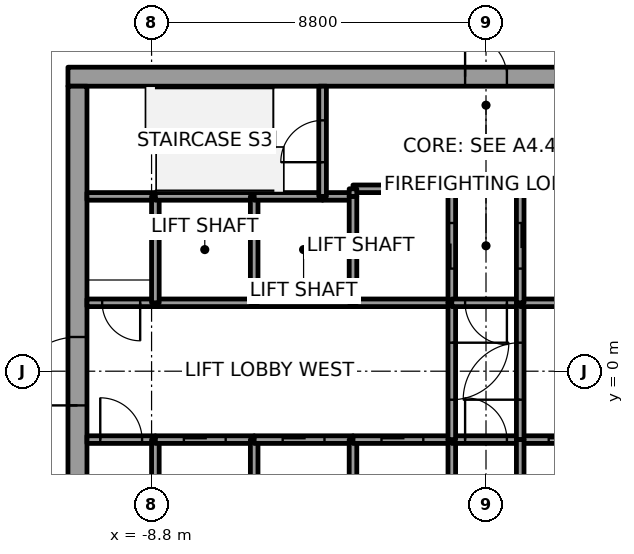
"""IFC4 building model, lengths in metres.
Left out: names, types, materials, properties, quantities, classifications, styles, units other than length and angle.
Written with IfcOpenShell. Run it as: python <this file> out.ifc"""

import sys

from ifc_helpers import new_model, si_unit, direction, frame, frame_2d, origin, place, context, subcontext, project, spatial, rectangle, extrude, element, fill, save


model = new_model("IFC4")
c1 = context("Model", 3, precision=1e-05, world=origin(), true_north=direction((0.0, 1.0)))
c2 = subcontext(c1, "Body", "Model", "MODEL_VIEW")
j1 = project(units=[si_unit("LENGTHUNIT", "METRE"), si_unit("PLANEANGLEUNIT", "RADIAN")], contexts=[c1])
p1 = place(None, origin())
s1 = spatial("IfcSite", under=j1, at=p1, CompositionType="ELEMENT")
p2 = place(p1, origin())
s2 = spatial("IfcBuilding", under=s1, at=p2, CompositionType="ELEMENT")
p3 = place(p2, frame((0.0, 0.0, 193.8)))
s3 = spatial("IfcBuildingStorey", under=s2, at=p3, CompositionType="ELEMENT", Elevation=193.8)
p4 = place(p3, frame((-11.0, 7.75, 0.0), z_axis=(0.0, 0.0, 1.0), x_axis=(1.0, 0.0, 0.0)))
e1 = element("IfcWall", 1, at=p4, inside=s3, PredefinedType="SHEAR", context=c2, shape_type="SweptSolid", body=[
    extrude(rectangle(XDim=22.0, YDim=0.5, at=frame_2d((11.0, 0.0))), origin(), (0.0, 0.0, 1.0), 4.0),
])
p5 = place(p4, frame((10.45, 0.0, 0.0)))
e2 = element("IfcOpeningElement", 2, at=p5, cuts=e1, PredefinedType="OPENING", context=c2, shape_type="SweptSolid", body=[
    extrude(rectangle(XDim=1.1, YDim=2.1, at=frame_2d((0.55, 1.05))), frame((0.0, 0.25, 0.0), z_axis=(0.0, -1.0, 0.0), x_axis=(1.0, 0.0, 0.0)), (0.0, 0.0, 1.0), 0.5),
])
p6 = place(p3, frame((-10.75, -7.5, 0.0), z_axis=(0.0, 0.0, 1.0), x_axis=(0.0, 1.0, 0.0)))
e3 = element("IfcWall", 3, at=p6, inside=s3, PredefinedType="SHEAR", context=c2, shape_type="SweptSolid", body=[
    extrude(rectangle(XDim=15.0, YDim=0.5, at=frame_2d((7.5, 0.0))), origin(), (0.0, 0.0, 1.0), 4.0),
])
p7 = place(p6, frame((6.6, 0.0, 0.0)))
e4 = element("IfcOpeningElement", 4, at=p7, cuts=e3, PredefinedType="OPENING", context=c2, shape_type="SweptSolid", body=[
    extrude(rectangle(XDim=1.8, YDim=2.1, at=frame_2d((0.9, 1.05))), frame((0.0, 0.25, 0.0), z_axis=(0.0, -1.0, 0.0), x_axis=(1.0, 0.0, 0.0)), (0.0, 0.0, 1.0), 0.5),
])
p8 = place(p3, frame((-10.5, -1.8, 0.0), z_axis=(0.0, 0.0, 1.0), x_axis=(1.0, 0.0, 0.0)))
e5 = element("IfcWall", 5, at=p8, inside=s3, PredefinedType="SOLIDWALL", context=c2, shape_type="SweptSolid", body=[
    extrude(rectangle(XDim=1.8, YDim=0.2, at=frame_2d((0.9, 0.0))), origin(), (0.0, 0.0, 1.0), 3.85),
])
p9 = place(p8, frame((0.35, 0.0, 0.0)))
e6 = element("IfcOpeningElement", 6, at=p9, cuts=e5, PredefinedType="OPENING", context=c2, shape_type="SweptSolid", body=[
    extrude(rectangle(XDim=1.1, YDim=2.1, at=frame_2d((0.55, 1.05))), frame((0.0, 0.1, 0.0), z_axis=(0.0, -1.0, 0.0), x_axis=(1.0, 0.0, 0.0)), (0.0, 0.0, 1.0), 0.2),
])
p10 = place(p3, frame((-8.7, 1.8, 0.0), z_axis=(0.0, 0.0, 1.0), x_axis=(-1.0, 0.0, 0.0)))
e7 = element("IfcWall", 7, at=p10, inside=s3, PredefinedType="SOLIDWALL", context=c2, shape_type="SweptSolid", body=[
    extrude(rectangle(XDim=1.8, YDim=0.2, at=frame_2d((0.9, 0.0))), origin(), (0.0, 0.0, 1.0), 3.85),
])
p11 = place(p10, frame((0.4, 0.0, 0.0)))
e8 = element("IfcOpeningElement", 8, at=p11, cuts=e7, PredefinedType="OPENING", context=c2, shape_type="SweptSolid", body=[
    extrude(rectangle(XDim=1.0, YDim=2.1, at=frame_2d((0.5, 1.05))), frame((0.0, 0.1, 0.0), z_axis=(0.0, -1.0, 0.0), x_axis=(1.0, 0.0, 0.0)), (0.0, 0.0, 1.0), 0.2),
])
p12 = place(p3, frame((-8.7, 4.6, 0.0), z_axis=(0.0, 0.0, 1.0), x_axis=(-1.0, 0.0, 0.0)))
e9 = element("IfcWall", 9, at=p12, inside=s3, PredefinedType="SOLIDWALL", context=c2, shape_type="SweptSolid", body=[
    extrude(rectangle(XDim=1.8, YDim=0.2, at=frame_2d((0.9, 0.0))), origin(), (0.0, 0.0, 1.0), 3.85),
])
p13 = place(p3, frame((-8.7, -4.6, 0.0), z_axis=(0.0, 0.0, 1.0), x_axis=(0.0, 1.0, 0.0)))
e10 = element("IfcWall", 10, at=p13, inside=s3, PredefinedType="SOLIDWALL", context=c2, shape_type="SweptSolid", body=[
    extrude(rectangle(XDim=2.8, YDim=0.2, at=frame_2d((1.4, 0.0))), origin(), (0.0, 0.0, 1.0), 3.85),
])
p14 = place(p3, frame((-8.7, -1.8, 0.0), z_axis=(0.0, 0.0, 1.0), x_axis=(1.0, 0.0, 0.0)))
e11 = element("IfcWall", 11, at=p14, inside=s3, PredefinedType="SOLIDWALL", context=c2, shape_type="SweptSolid", body=[
    extrude(rectangle(XDim=2.6, YDim=0.2, at=frame_2d((1.3, 0.0))), origin(), (0.0, 0.0, 1.0), 3.85),
])
p15 = place(p14, frame((0.75, 0.0, 0.0)))
e12 = element("IfcOpeningElement", 12, at=p15, cuts=e11, PredefinedType="OPENING", context=c2, shape_type="SweptSolid", body=[
    extrude(rectangle(XDim=1.1, YDim=2.1, at=frame_2d((0.55, 1.05))), frame((0.0, 0.1, 0.0), z_axis=(0.0, -1.0, 0.0), x_axis=(1.0, 0.0, 0.0)), (0.0, 0.0, 1.0), 0.2),
])
p16 = place(p3, frame((-6.1, 1.8, 0.0), z_axis=(0.0, 0.0, 1.0), x_axis=(-1.0, 0.0, 0.0)))
e13 = element("IfcWall", 13, at=p16, inside=s3, PredefinedType="SOLIDWALL", context=c2, shape_type="SweptSolid", body=[
    extrude(rectangle(XDim=2.6, YDim=0.2, at=frame_2d((1.3, 0.0))), origin(), (0.0, 0.0, 1.0), 3.85),
])
p17 = place(p3, frame((-8.7, 1.8, 0.0), z_axis=(0.0, 0.0, 1.0), x_axis=(0.0, 1.0, 0.0)))
e14 = element("IfcWall", 14, at=p17, inside=s3, PredefinedType="SOLIDWALL", context=c2, shape_type="SweptSolid", body=[
    extrude(rectangle(XDim=2.8, YDim=0.2, at=frame_2d((1.4, 0.0))), origin(), (0.0, 0.0, 1.0), 3.85),
])
p18 = place(p3, frame((-6.1, 4.6, 0.0), z_axis=(0.0, 0.0, 1.0), x_axis=(-1.0, 0.0, 0.0)))
e15 = element("IfcWall", 15, at=p18, inside=s3, PredefinedType="SOLIDWALL", context=c2, shape_type="SweptSolid", body=[
    extrude(rectangle(XDim=2.6, YDim=0.2, at=frame_2d((1.3, 0.0))), origin(), (0.0, 0.0, 1.0), 3.85),
])
p19 = place(p3, frame((-6.1, -4.6, 0.0), z_axis=(0.0, 0.0, 1.0), x_axis=(0.0, 1.0, 0.0)))
e16 = element("IfcWall", 16, at=p19, inside=s3, PredefinedType="SOLIDWALL", context=c2, shape_type="SweptSolid", body=[
    extrude(rectangle(XDim=2.8, YDim=0.2, at=frame_2d((1.4, 0.0))), origin(), (0.0, 0.0, 1.0), 3.85),
])
p20 = place(p3, frame((-6.1, -1.8, 0.0), z_axis=(0.0, 0.0, 1.0), x_axis=(1.0, 0.0, 0.0)))
e17 = element("IfcWall", 17, at=p20, inside=s3, PredefinedType="SOLIDWALL", context=c2, shape_type="SweptSolid", body=[
    extrude(rectangle(XDim=2.6, YDim=0.2, at=frame_2d((1.3, 0.0))), origin(), (0.0, 0.0, 1.0), 3.85),
])
p21 = place(p20, frame((0.75, 0.0, 0.0)))
e18 = element("IfcOpeningElement", 18, at=p21, cuts=e17, PredefinedType="OPENING", context=c2, shape_type="SweptSolid", body=[
    extrude(rectangle(XDim=1.1, YDim=2.1, at=frame_2d((0.55, 1.05))), frame((0.0, 0.1, 0.0), z_axis=(0.0, -1.0, 0.0), x_axis=(1.0, 0.0, 0.0)), (0.0, 0.0, 1.0), 0.2),
])
p22 = place(p3, frame((-3.5, 1.8, 0.0), z_axis=(0.0, 0.0, 1.0), x_axis=(-1.0, 0.0, 0.0)))
e19 = element("IfcWall", 19, at=p22, inside=s3, PredefinedType="SOLIDWALL", context=c2, shape_type="SweptSolid", body=[
    extrude(rectangle(XDim=2.6, YDim=0.2, at=frame_2d((1.3, 0.0))), origin(), (0.0, 0.0, 1.0), 3.85),
])
p23 = place(p3, frame((-6.1, 1.8, 0.0), z_axis=(0.0, 0.0, 1.0), x_axis=(0.0, 1.0, 0.0)))
e20 = element("IfcWall", 20, at=p23, inside=s3, PredefinedType="SOLIDWALL", context=c2, shape_type="SweptSolid", body=[
    extrude(rectangle(XDim=2.8, YDim=0.2, at=frame_2d((1.4, 0.0))), origin(), (0.0, 0.0, 1.0), 3.85),
])
p24 = place(p3, frame((-4.3, 4.6, 0.0), z_axis=(0.0, 0.0, 1.0), x_axis=(-1.0, 0.0, 0.0)))
e21 = element("IfcWall", 21, at=p24, inside=s3, PredefinedType="SOLIDWALL", context=c2, shape_type="SweptSolid", body=[
    extrude(rectangle(XDim=1.8, YDim=0.2, at=frame_2d((0.9, 0.0))), origin(), (0.0, 0.0, 1.0), 3.85),
])
p25 = place(p3, frame((-3.5, 4.6, 0.0), z_axis=(0.0, 0.0, 1.0), x_axis=(-1.0, 0.0, 0.0)))
e22 = element("IfcWall", 22, at=p25, inside=s3, PredefinedType="SOLIDWALL", context=c2, shape_type="SweptSolid", body=[
    extrude(rectangle(XDim=0.8, YDim=0.2, at=frame_2d((0.4, 0.0))), origin(), (0.0, 0.0, 1.0), 3.85),
])
p26 = place(p3, frame((-4.3, 4.6, 0.0), z_axis=(0.0, 0.0, 1.0), x_axis=(0.0, 1.0, 0.0)))
e23 = element("IfcWall", 23, at=p26, inside=s3, PredefinedType="SOLIDWALL", context=c2, shape_type="SweptSolid", body=[
    extrude(rectangle(XDim=2.9, YDim=0.2, at=frame_2d((1.45, 0.0))), origin(), (0.0, 0.0, 1.0), 3.85),
])
p27 = place(p26, frame((0.9, 0.0, 0.0)))
e24 = element("IfcOpeningElement", 24, at=p27, cuts=e23, PredefinedType="OPENING", context=c2, shape_type="SweptSolid", body=[
    extrude(rectangle(XDim=1.1, YDim=2.1, at=frame_2d((0.55, 1.05))), frame((0.0, 0.1, 0.0), z_axis=(0.0, -1.0, 0.0), x_axis=(1.0, 0.0, 0.0)), (0.0, 0.0, 1.0), 0.2),
])
p28 = place(p3, frame((-3.5, -4.6, 0.0), z_axis=(0.0, 0.0, 1.0), x_axis=(0.0, 1.0, 0.0)))
e25 = element("IfcWall", 25, at=p28, inside=s3, PredefinedType="SOLIDWALL", context=c2, shape_type="SweptSolid", body=[
    extrude(rectangle(XDim=2.8, YDim=0.2, at=frame_2d((1.4, 0.0))), origin(), (0.0, 0.0, 1.0), 3.85),
])
p29 = place(p3, frame((-3.5, -1.8, 0.0), z_axis=(0.0, 0.0, 1.0), x_axis=(1.0, 0.0, 0.0)))
e26 = element("IfcWall", 26, at=p29, inside=s3, PredefinedType="SOLIDWALL", context=c2, shape_type="SweptSolid", body=[
    extrude(rectangle(XDim=2.6, YDim=0.2, at=frame_2d((1.3, 0.0))), origin(), (0.0, 0.0, 1.0), 3.85),
])
p30 = place(p29, frame((0.75, 0.0, 0.0)))
e27 = element("IfcOpeningElement", 27, at=p30, cuts=e26, PredefinedType="OPENING", context=c2, shape_type="SweptSolid", body=[
    extrude(rectangle(XDim=1.1, YDim=2.1, at=frame_2d((0.55, 1.05))), frame((0.0, 0.1, 0.0), z_axis=(0.0, -1.0, 0.0), x_axis=(1.0, 0.0, 0.0)), (0.0, 0.0, 1.0), 0.2),
])
p31 = place(p3, frame((-0.9, 1.8, 0.0), z_axis=(0.0, 0.0, 1.0), x_axis=(-1.0, 0.0, 0.0)))
e28 = element("IfcWall", 28, at=p31, inside=s3, PredefinedType="SOLIDWALL", context=c2, shape_type="SweptSolid", body=[
    extrude(rectangle(XDim=2.6, YDim=0.2, at=frame_2d((1.3, 0.0))), origin(), (0.0, 0.0, 1.0), 3.85),
])
p32 = place(p3, frame((-3.5, 4.6, 0.0), z_axis=(0.0, 0.0, 1.0), x_axis=(0.0, -1.0, 0.0)))
e29 = element("IfcWall", 29, at=p32, inside=s3, PredefinedType="SOLIDWALL", context=c2, shape_type="SweptSolid", body=[
    extrude(rectangle(XDim=2.8, YDim=0.2, at=frame_2d((1.4, 0.0))), origin(), (0.0, 0.0, 1.0), 3.85),
])
p33 = place(p3, frame((-0.9, 1.8, 0.0), z_axis=(0.0, 0.0, 1.0), x_axis=(0.0, 1.0, 0.0)))
e30 = element("IfcWall", 30, at=p33, inside=s3, PredefinedType="SOLIDWALL", context=c2, shape_type="SweptSolid", body=[
    extrude(rectangle(XDim=3.0, YDim=0.2, at=frame_2d((1.5, 0.0))), origin(), (0.0, 0.0, 1.0), 3.85),
])
p34 = place(p33, frame((0.9, 0.0, 0.0)))
e31 = element("IfcOpeningElement", 31, at=p34, cuts=e30, PredefinedType="OPENING", context=c2, shape_type="SweptSolid", body=[
    extrude(rectangle(XDim=1.2, YDim=2.1, at=frame_2d((0.6, 1.05))), frame((0.0, 0.1, 0.0), z_axis=(0.0, -1.0, 0.0), x_axis=(1.0, 0.0, 0.0)), (0.0, 0.0, 1.0), 0.2),
])
p35 = place(p3, frame((-0.9, 4.8, 0.0), z_axis=(0.0, 0.0, 1.0), x_axis=(-1.0, 0.0, 0.0)))
e32 = element("IfcWall", 32, at=p35, inside=s3, PredefinedType="SOLIDWALL", context=c2, shape_type="SweptSolid", body=[
    extrude(rectangle(XDim=2.6, YDim=0.2, at=frame_2d((1.3, 0.0))), origin(), (0.0, 0.0, 1.0), 3.85),
])
p36 = place(p3, frame((-3.5, 4.8, 0.0), z_axis=(0.0, 0.0, 1.0), x_axis=(0.0, -1.0, 0.0)))
e33 = element("IfcWall", 33, at=p36, inside=s3, PredefinedType="SOLIDWALL", context=c2, shape_type="SweptSolid", body=[
    extrude(rectangle(XDim=0.2, YDim=0.2, at=frame_2d((0.1, 0.0))), origin(), (0.0, 0.0, 1.0), 3.85),
])
p37 = place(p3, frame((-0.9, -4.6, 0.0), z_axis=(0.0, 0.0, 1.0), x_axis=(0.0, 1.0, 0.0)))
e34 = element("IfcWall", 34, at=p37, inside=s3, PredefinedType="SOLIDWALL", context=c2, shape_type="SweptSolid", body=[
    extrude(rectangle(XDim=2.8, YDim=0.2, at=frame_2d((1.4, 0.0))), origin(), (0.0, 0.0, 1.0), 3.85),
])
p38 = place(p3, frame((-0.9, -1.8, 0.0), z_axis=(0.0, 0.0, 1.0), x_axis=(1.0, 0.0, 0.0)))
e35 = element("IfcWall", 35, at=p38, inside=s3, PredefinedType="SOLIDWALL", context=c2, shape_type="SweptSolid", body=[
    extrude(rectangle(XDim=1.8, YDim=0.2, at=frame_2d((0.9, 0.0))), origin(), (0.0, 0.0, 1.0), 3.85),
])
p39 = place(p38, frame((0.35, 0.0, 0.0)))
e36 = element("IfcOpeningElement", 36, at=p39, cuts=e35, PredefinedType="OPENING", context=c2, shape_type="SweptSolid", body=[
    extrude(rectangle(XDim=1.1, YDim=2.1, at=frame_2d((0.55, 1.05))), frame((0.0, 0.1, 0.0), z_axis=(0.0, -1.0, 0.0), x_axis=(1.0, 0.0, 0.0)), (0.0, 0.0, 1.0), 0.2),
])
p40 = place(p3, frame((-0.9, 1.8, 0.0), z_axis=(0.0, 0.0, 1.0), x_axis=(0.0, -1.0, 0.0)))
e37 = element("IfcWall", 37, at=p40, inside=s3, PredefinedType="SOLIDWALL", context=c2, shape_type="SweptSolid", body=[
    extrude(rectangle(XDim=3.6, YDim=0.2, at=frame_2d((1.8, 0.0))), origin(), (0.0, 0.0, 1.0), 3.85),
])
p41 = place(p40, frame((1.05, 0.0, 0.0)))
e38 = element("IfcOpeningElement", 38, at=p41, cuts=e37, PredefinedType="OPENING", context=c2, shape_type="SweptSolid", body=[
    extrude(rectangle(XDim=1.5, YDim=2.1, at=frame_2d((0.75, 1.05))), frame((0.0, 0.1, 0.0), z_axis=(0.0, -1.0, 0.0), x_axis=(1.0, 0.0, 0.0)), (0.0, 0.0, 1.0), 0.2),
])
p42 = place(p3, frame((0.9, 1.8, 0.0), z_axis=(0.0, 0.0, 1.0), x_axis=(-1.0, 0.0, 0.0)))
e39 = element("IfcWall", 39, at=p42, inside=s3, PredefinedType="SOLIDWALL", context=c2, shape_type="SweptSolid", body=[
    extrude(rectangle(XDim=1.8, YDim=0.2, at=frame_2d((0.9, 0.0))), origin(), (0.0, 0.0, 1.0), 3.85),
])
p43 = place(p42, frame((0.35, 0.0, 0.0)))
e40 = element("IfcOpeningElement", 40, at=p43, cuts=e39, PredefinedType="OPENING", context=c2, shape_type="SweptSolid", body=[
    extrude(rectangle(XDim=1.1, YDim=2.1, at=frame_2d((0.55, 1.05))), frame((0.0, 0.1, 0.0), z_axis=(0.0, -1.0, 0.0), x_axis=(1.0, 0.0, 0.0)), (0.0, 0.0, 1.0), 0.2),
])
p44 = place(p3, frame((0.9, -1.8, 0.0), z_axis=(0.0, 0.0, 1.0), x_axis=(1.0, 0.0, 0.0)))
e41 = element("IfcWall", 41, at=p44, inside=s3, PredefinedType="SOLIDWALL", context=c2, shape_type="SweptSolid", body=[
    extrude(rectangle(XDim=2.6, YDim=0.2, at=frame_2d((1.3, 0.0))), origin(), (0.0, 0.0, 1.0), 3.85),
])
p45 = place(p44, frame((0.75, 0.0, 0.0)))
e42 = element("IfcOpeningElement", 42, at=p45, cuts=e41, PredefinedType="OPENING", context=c2, shape_type="SweptSolid", body=[
    extrude(rectangle(XDim=1.1, YDim=2.1, at=frame_2d((0.55, 1.05))), frame((0.0, 0.1, 0.0), z_axis=(0.0, -1.0, 0.0), x_axis=(1.0, 0.0, 0.0)), (0.0, 0.0, 1.0), 0.2),
])
p46 = place(p3, frame((0.9, -1.8, 0.0), z_axis=(0.0, 0.0, 1.0), x_axis=(0.0, 1.0, 0.0)))
e43 = element("IfcWall", 43, at=p46, inside=s3, PredefinedType="SOLIDWALL", context=c2, shape_type="SweptSolid", body=[
    extrude(rectangle(XDim=3.6, YDim=0.2, at=frame_2d((1.8, 0.0))), origin(), (0.0, 0.0, 1.0), 3.85),
])
p47 = place(p46, frame((1.05, 0.0, 0.0)))
e44 = element("IfcOpeningElement", 44, at=p47, cuts=e43, PredefinedType="OPENING", context=c2, shape_type="SweptSolid", body=[
    extrude(rectangle(XDim=1.5, YDim=2.1, at=frame_2d((0.75, 1.05))), frame((0.0, 0.1, 0.0), z_axis=(0.0, -1.0, 0.0), x_axis=(1.0, 0.0, 0.0)), (0.0, 0.0, 1.0), 0.2),
])
p48 = place(p3, frame((0.9, -1.8, 0.0), z_axis=(0.0, 0.0, 1.0), x_axis=(0.0, -1.0, 0.0)))
e45 = element("IfcWall", 45, at=p48, inside=s3, PredefinedType="SOLIDWALL", context=c2, shape_type="SweptSolid", body=[
    extrude(rectangle(XDim=2.8, YDim=0.2, at=frame_2d((1.4, 0.0))), origin(), (0.0, 0.0, 1.0), 3.85),
])
for number, where, z_axis, x_axis in (
    (46, (3.5, 1.8, 0.0), (0.0, 0.0, 1.0), (-1.0, 0.0, 0.0)),
    (47, (3.5, 4.8, 0.0), (0.0, 0.0, 1.0), (-1.0, 0.0, 0.0)),
):
    element("IfcWall", number, at=place(p3, frame(where, z_axis=z_axis, x_axis=x_axis)), inside=s3, PredefinedType="SOLIDWALL", context=c2, shape_type="SweptSolid", body=[
        extrude(rectangle(XDim=2.6, YDim=0.2, at=frame_2d((1.3, 0.0))), origin(), (0.0, 0.0, 1.0), 3.85),
    ])
p49 = place(p3, frame((0.9, 4.8, 0.0), z_axis=(0.0, 0.0, 1.0), x_axis=(0.0, -1.0, 0.0)))
e48 = element("IfcWall", 48, at=p49, inside=s3, PredefinedType="SOLIDWALL", context=c2, shape_type="SweptSolid", body=[
    extrude(rectangle(XDim=3.0, YDim=0.2, at=frame_2d((1.5, 0.0))), origin(), (0.0, 0.0, 1.0), 3.85),
])
p50 = place(p49, frame((0.9, 0.0, 0.0)))
e49 = element("IfcOpeningElement", 49, at=p50, cuts=e48, PredefinedType="OPENING", context=c2, shape_type="SweptSolid", body=[
    extrude(rectangle(XDim=1.2, YDim=2.1, at=frame_2d((0.6, 1.05))), frame((0.0, 0.1, 0.0), z_axis=(0.0, -1.0, 0.0), x_axis=(1.0, 0.0, 0.0)), (0.0, 0.0, 1.0), 0.2),
])
p51 = place(p15, origin())
e50 = element("IfcDoor", 50, at=p51, inside=s3, OperationType="SLIDING_TO_LEFT", PredefinedType="DOOR", context=c2, shape_type="SweptSolid", body=[
    extrude(rectangle(XDim=1.1, YDim=2.1, at=frame_2d((0.55, 1.05))), frame((0.0, 0.025, 0.0), z_axis=(0.0, -1.0, 0.0), x_axis=(1.0, 0.0, 0.0)), (0.0, 0.0, 1.0), 0.05),
])
fill(e12, e50)
p52 = place(p21, origin())
e51 = element("IfcDoor", 51, at=p52, inside=s3, OperationType="SLIDING_TO_RIGHT", PredefinedType="DOOR", context=c2, shape_type="SweptSolid", body=[
    extrude(rectangle(XDim=1.1, YDim=2.1, at=frame_2d((0.55, 1.05))), frame((0.0, 0.025, 0.0), z_axis=(0.0, -1.0, 0.0), x_axis=(1.0, 0.0, 0.0)), (0.0, 0.0, 1.0), 0.05),
])
fill(e18, e51)
p53 = place(p30, origin())
e52 = element("IfcDoor", 52, at=p53, inside=s3, OperationType="SLIDING_TO_RIGHT", PredefinedType="DOOR", context=c2, shape_type="SweptSolid", body=[
    extrude(rectangle(XDim=1.1, YDim=2.1, at=frame_2d((0.55, 1.05))), frame((0.0, 0.025, 0.0), z_axis=(0.0, -1.0, 0.0), x_axis=(1.0, 0.0, 0.0)), (0.0, 0.0, 1.0), 0.05),
])
fill(e27, e52)
p54 = place(p45, origin())
e53 = element("IfcDoor", 53, at=p54, inside=s3, OperationType="SLIDING_TO_RIGHT", PredefinedType="DOOR", context=c2, shape_type="SweptSolid", body=[
    extrude(rectangle(XDim=1.1, YDim=2.1, at=frame_2d((0.55, 1.05))), frame((0.0, 0.025, 0.0), z_axis=(0.0, -1.0, 0.0), x_axis=(1.0, 0.0, 0.0)), (0.0, 0.0, 1.0), 0.05),
])
fill(e42, e53)
p55 = place(p34, origin())
e54 = element("IfcDoor", 54, at=p55, inside=s3, OperationType="SLIDING_TO_LEFT", PredefinedType="DOOR", context=c2, shape_type="SweptSolid", body=[
    extrude(rectangle(XDim=1.2, YDim=2.1, at=frame_2d((0.6, 1.05))), frame((0.0, 0.025, 0.0), z_axis=(0.0, -1.0, 0.0), x_axis=(1.0, 0.0, 0.0)), (0.0, 0.0, 1.0), 0.05),
])
fill(e31, e54)
p56 = place(p50, origin())
e55 = element("IfcDoor", 55, at=p56, inside=s3, OperationType="SLIDING_TO_LEFT", PredefinedType="DOOR", context=c2, shape_type="SweptSolid", body=[
    extrude(rectangle(XDim=1.2, YDim=2.1, at=frame_2d((0.6, 1.05))), frame((0.0, 0.025, 0.0), z_axis=(0.0, -1.0, 0.0), x_axis=(1.0, 0.0, 0.0)), (0.0, 0.0, 1.0), 0.05),
])
fill(e49, e55)
p57 = place(p41, origin())
e56 = element("IfcDoor", 56, at=p57, inside=s3, OperationType="DOUBLE_DOOR_SINGLE_SWING", PredefinedType="DOOR", context=c2, shape_type="SweptSolid", body=[
    extrude(rectangle(XDim=1.5, YDim=2.1, at=frame_2d((0.75, 1.05))), frame((0.0, 0.025, 0.0), z_axis=(0.0, -1.0, 0.0), x_axis=(1.0, 0.0, 0.0)), (0.0, 0.0, 1.0), 0.05),
])
fill(e38, e56)
p58 = place(p47, origin())
e57 = element("IfcDoor", 57, at=p58, inside=s3, OperationType="DOUBLE_DOOR_SINGLE_SWING", PredefinedType="DOOR", context=c2, shape_type="SweptSolid", body=[
    extrude(rectangle(XDim=1.5, YDim=2.1, at=frame_2d((0.75, 1.05))), frame((0.0, 0.025, 0.0), z_axis=(0.0, -1.0, 0.0), x_axis=(1.0, 0.0, 0.0)), (0.0, 0.0, 1.0), 0.05),
])
fill(e44, e57)
p59 = place(p9, origin())
e58 = element("IfcDoor", 58, at=p59, inside=s3, OperationType="SINGLE_SWING_LEFT", PredefinedType="DOOR", context=c2, shape_type="SweptSolid", body=[
    extrude(rectangle(XDim=1.1, YDim=2.1, at=frame_2d((0.55, 1.05))), frame((0.0, 0.025, 0.0), z_axis=(0.0, -1.0, 0.0), x_axis=(1.0, 0.0, 0.0)), (0.0, 0.0, 1.0), 0.05),
])
fill(e6, e58)
p60 = place(p43, origin())
e59 = element("IfcDoor", 59, at=p60, inside=s3, OperationType="SINGLE_SWING_LEFT", PredefinedType="DOOR", context=c2, shape_type="SweptSolid", body=[
    extrude(rectangle(XDim=1.1, YDim=2.1, at=frame_2d((0.55, 1.05))), frame((0.0, 0.025, 0.0), z_axis=(0.0, -1.0, 0.0), x_axis=(1.0, 0.0, 0.0)), (0.0, 0.0, 1.0), 0.05),
])
fill(e40, e59)
p61 = place(p39, origin())
e60 = element("IfcDoor", 60, at=p61, inside=s3, OperationType="SINGLE_SWING_RIGHT", PredefinedType="DOOR", context=c2, shape_type="SweptSolid", body=[
    extrude(rectangle(XDim=1.1, YDim=2.1, at=frame_2d((0.55, 1.05))), frame((0.0, 0.025, 0.0), z_axis=(0.0, -1.0, 0.0), x_axis=(1.0, 0.0, 0.0)), (0.0, 0.0, 1.0), 0.05),
])
fill(e36, e60)
p62 = place(p11, origin())
e61 = element("IfcDoor", 61, at=p62, inside=s3, OperationType="SINGLE_SWING_RIGHT", PredefinedType="DOOR", context=c2, shape_type="SweptSolid", body=[
    extrude(rectangle(XDim=1.0, YDim=2.1, at=frame_2d((0.5, 1.05))), frame((0.0, 0.025, 0.0), z_axis=(0.0, -1.0, 0.0), x_axis=(1.0, 0.0, 0.0)), (0.0, 0.0, 1.0), 0.05),
])
fill(e8, e61)
p63 = place(p27, origin())
e62 = element("IfcDoor", 62, at=p63, inside=s3, OperationType="SINGLE_SWING_RIGHT", PredefinedType="DOOR", context=c2, shape_type="SweptSolid", body=[
    extrude(rectangle(XDim=1.1, YDim=2.1, at=frame_2d((0.55, 1.05))), frame((0.0, 0.025, 0.0), z_axis=(0.0, -1.0, 0.0), x_axis=(1.0, 0.0, 0.0)), (0.0, 0.0, 1.0), 0.05),
])
fill(e24, e62)
p64 = place(p7, origin())
e63 = element("IfcDoor", 63, at=p64, inside=s3, OperationType="DOUBLE_DOOR_SINGLE_SWING", PredefinedType="DOOR", context=c2, shape_type="SweptSolid", body=[
    extrude(rectangle(XDim=1.8, YDim=2.1, at=frame_2d((0.9, 1.05))), frame((0.0, 0.025, 0.0), z_axis=(0.0, -1.0, 0.0), x_axis=(1.0, 0.0, 0.0)), (0.0, 0.0, 1.0), 0.05),
])
fill(e4, e63)
p65 = place(p5, origin())
e64 = element("IfcDoor", 64, at=p65, inside=s3, OperationType="SINGLE_SWING_LEFT", PredefinedType="DOOR", context=c2, shape_type="SweptSolid", body=[
    extrude(rectangle(XDim=1.1, YDim=2.1, at=frame_2d((0.55, 1.05))), frame((0.0, 0.025, 0.0), z_axis=(0.0, -1.0, 0.0), x_axis=(1.0, 0.0, 0.0)), (0.0, 0.0, 1.0), 0.05),
])
fill(e2, e64)
save(model, sys.argv[1])
